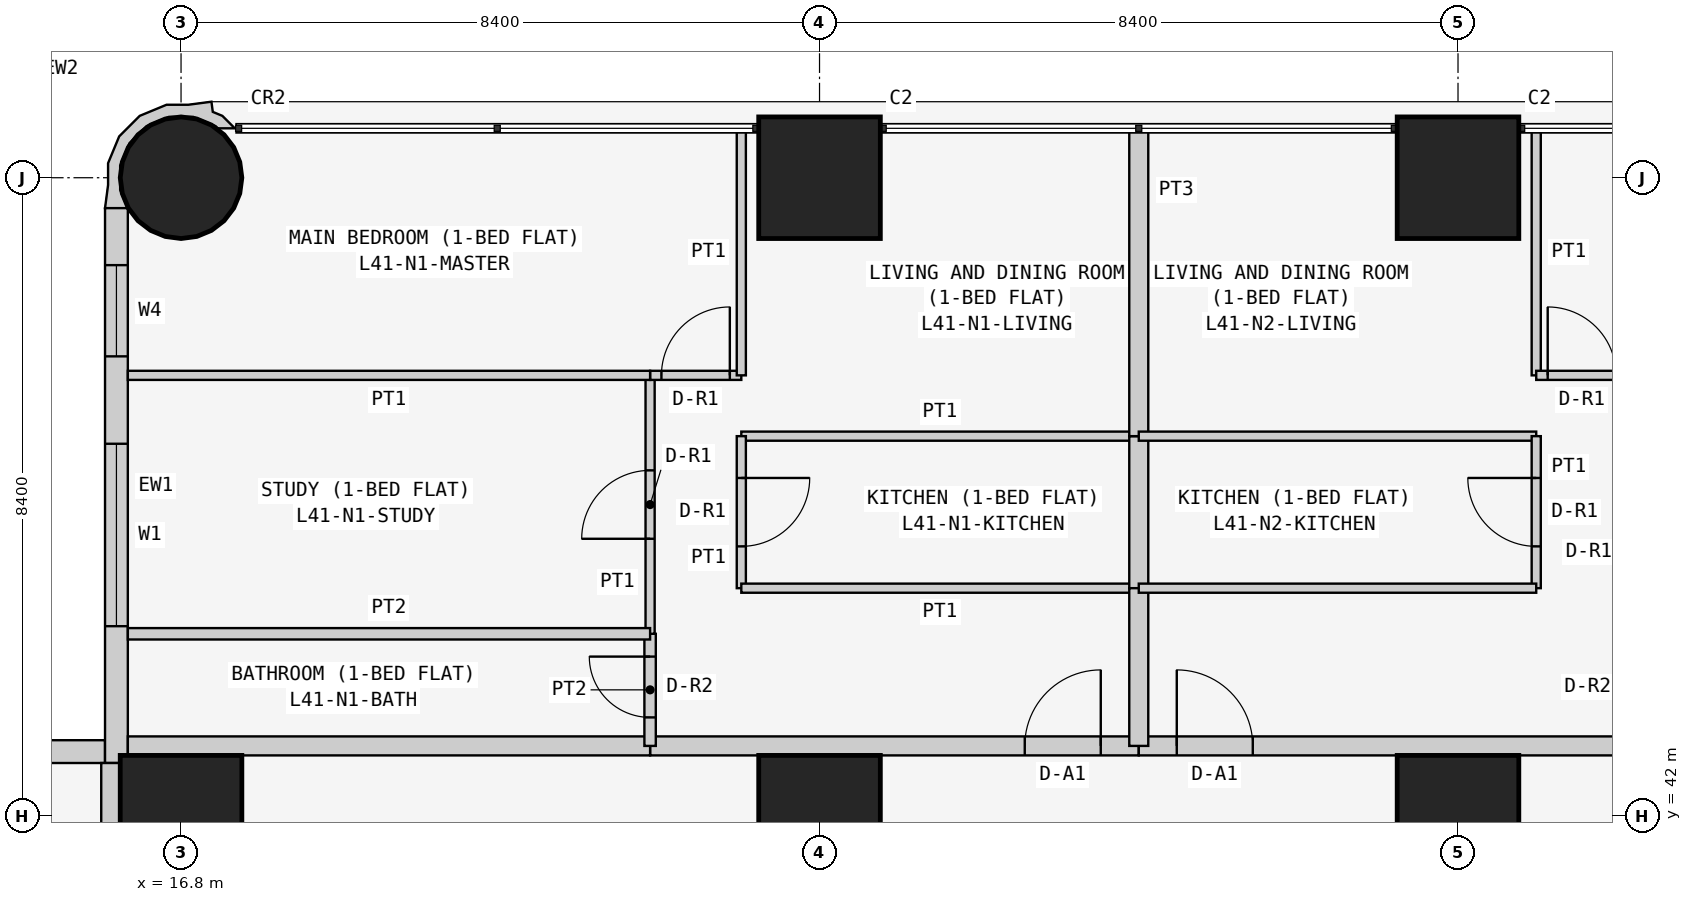
"""IFC4 building model, lengths in metres.
Left out: names, types, materials, properties, quantities, classifications, styles, units other than length and angle.
Written with IfcOpenShell. Run it as: python <this file> out.ifc"""

import sys

from ifc_helpers import new_model, si_unit, direction, frame, frame_2d, origin, origin_2d, place, context, subcontext, project, spatial, polyline, rectangle, circle, outline, extrude, element, fill, save


model = new_model("IFC4")
c1 = context("Model", 3, precision=1e-05, world=origin(), true_north=direction((0.0, 1.0)))
c2 = subcontext(c1, "Body", "Model", "MODEL_VIEW")
j1 = project(units=[si_unit("LENGTHUNIT", "METRE"), si_unit("PLANEANGLEUNIT", "RADIAN")], contexts=[c1])
p1 = place(None, origin())
s1 = spatial("IfcSite", under=j1, at=p1, CompositionType="ELEMENT")
p2 = place(p1, origin())
s2 = spatial("IfcBuilding", under=s1, at=p2, CompositionType="ELEMENT")
p3 = place(p2, frame((0.0, 0.0, 159.3)))
s3 = spatial("IfcBuildingStorey", under=s2, at=p3, CompositionType="ELEMENT", Elevation=159.3)
p4 = place(p3, frame((16.8, 42.0, 0.0), z_axis=(0.0, 0.0, 1.0), x_axis=(1.0, 0.0, 0.0)))
e1 = element("IfcColumn", 1, at=p4, inside=s3, PredefinedType="COLUMN", context=c2, shape_type="SweptSolid", body=[
    extrude(rectangle(XDim=1.6, YDim=1.6, at=origin_2d()), origin(), (0.0, 0.0, 1.0), 3.6),
])
p5 = place(p3, frame((16.8, 50.4, 0.0), z_axis=(0.0, 0.0, 1.0), x_axis=(1.0, 0.0, 0.0)))
e2 = element("IfcColumn", 2, at=p5, inside=s3, PredefinedType="COLUMN", context=c2, shape_type="SweptSolid", body=[
    extrude(circle(Radius=0.8, at=origin_2d()), origin(), (0.0, 0.0, 1.0), 3.6),
])
for number, where, z_axis, x_axis in (
    (3, (25.2, 42.0, 0.0), (0.0, 0.0, 1.0), (1.0, 0.0, 0.0)),
    (4, (25.2, 50.4, 0.0), (0.0, 0.0, 1.0), (1.0, 0.0, 0.0)),
    (5, (33.6, 42.0, 0.0), (0.0, 0.0, 1.0), (1.0, 0.0, 0.0)),
    (6, (33.6, 50.4, 0.0), (0.0, 0.0, 1.0), (1.0, 0.0, 0.0)),
):
    element("IfcColumn", number, at=place(p3, frame(where, z_axis=z_axis, x_axis=x_axis)), inside=s3, PredefinedType="COLUMN", context=c2, shape_type="SweptSolid", body=[
        extrude(rectangle(XDim=1.6, YDim=1.6, at=origin_2d()), origin(), (0.0, 0.0, 1.0), 3.6),
    ])
p6 = place(p3, frame((15.8, 42.85, 0.0), z_axis=(0.0, 0.0, 1.0), x_axis=(-1.0, 0.0, 0.0)))
e7 = element("IfcWall", 7, at=p6, inside=s3, PredefinedType="SOLIDWALL", context=c2, shape_type="SweptSolid", body=[
    extrude(rectangle(XDim=15.4, YDim=0.3, at=frame_2d((7.7, 0.0))), origin(), (0.0, 0.0, 1.0), 3.45),
])
p7 = place(p6, frame((1.2, 0.0, 0.9)))
e8 = element("IfcOpeningElement", 8, at=p7, cuts=e7, PredefinedType="OPENING", context=c2, shape_type="SweptSolid", body=[
    extrude(rectangle(XDim=1.8, YDim=1.5, at=frame_2d((0.9, 0.75))), frame((0.0, 0.16, 0.0), z_axis=(0.0, -1.0, 0.0), x_axis=(1.0, 0.0, 0.0)), (0.0, 0.0, 1.0), 0.32),
])
p8 = place(p6, frame((4.95, 0.0, 1.5)))
e9 = element("IfcOpeningElement", 9, at=p8, cuts=e7, PredefinedType="OPENING", context=c2, shape_type="SweptSolid", body=[
    extrude(rectangle(XDim=0.9, YDim=0.7, at=frame_2d((0.45, 0.35))), frame((0.0, 0.16, 0.0), z_axis=(0.0, -1.0, 0.0), x_axis=(1.0, 0.0, 0.0)), (0.0, 0.0, 1.0), 0.32),
])
p9 = place(p6, frame((8.5, 0.0, 0.9)))
e10 = element("IfcOpeningElement", 10, at=p9, cuts=e7, PredefinedType="OPENING", context=c2, shape_type="SweptSolid", body=[
    extrude(rectangle(XDim=1.8, YDim=1.5, at=frame_2d((0.9, 0.75))), frame((0.0, 0.16, 0.0), z_axis=(0.0, -1.0, 0.0), x_axis=(1.0, 0.0, 0.0)), (0.0, 0.0, 1.0), 0.32),
])
p10 = place(p6, frame((12.5, 0.0, 0.0)))
e11 = element("IfcOpeningElement", 11, at=p10, cuts=e7, PredefinedType="OPENING", context=c2, shape_type="SweptSolid", body=[
    extrude(rectangle(XDim=0.9, YDim=2.4, at=frame_2d((0.45, 1.2))), frame((0.0, 0.16, 0.0), z_axis=(0.0, -1.0, 0.0), x_axis=(1.0, 0.0, 0.0)), (0.0, 0.0, 1.0), 0.32),
])
p11 = place(p6, frame((13.5, 0.0, 0.9)))
e12 = element("IfcOpeningElement", 12, at=p11, cuts=e7, PredefinedType="OPENING", context=c2, shape_type="SweptSolid", body=[
    extrude(rectangle(XDim=1.2, YDim=1.5, at=frame_2d((0.6, 0.75))), frame((0.0, 0.16, 0.0), z_axis=(0.0, -1.0, 0.0), x_axis=(1.0, 0.0, 0.0)), (0.0, 0.0, 1.0), 0.32),
])
p12 = place(p3, frame((15.95, 50.0, 0.0), z_axis=(0.0, 0.0, 1.0), x_axis=(0.0, -1.0, 0.0)))
e13 = element("IfcWall", 13, at=p12, inside=s3, PredefinedType="SOLIDWALL", context=c2, shape_type="SweptSolid", body=[
    extrude(rectangle(XDim=7.3, YDim=0.3, at=frame_2d((3.65, 0.0))), origin(), (0.0, 0.0, 1.0), 3.45),
])
p13 = place(p12, frame((3.1, 0.0, 0.9)))
e14 = element("IfcOpeningElement", 14, at=p13, cuts=e13, PredefinedType="OPENING", context=c2, shape_type="SweptSolid", body=[
    extrude(rectangle(XDim=2.4, YDim=1.5, at=frame_2d((1.2, 0.75))), frame((0.0, 0.16, 0.0), z_axis=(0.0, -1.0, 0.0), x_axis=(1.0, 0.0, 0.0)), (0.0, 0.0, 1.0), 0.32),
])
p14 = place(p12, frame((0.75, 0.0, 0.9)))
e15 = element("IfcOpeningElement", 15, at=p14, cuts=e13, PredefinedType="OPENING", context=c2, shape_type="SweptSolid", body=[
    extrude(rectangle(XDim=1.2, YDim=1.5, at=frame_2d((0.6, 0.75))), frame((0.0, 0.16, 0.0), z_axis=(0.0, -1.0, 0.0), x_axis=(1.0, 0.0, 0.0)), (0.0, 0.0, 1.0), 0.32),
])
p15 = place(p3, frame((17.448, 50.995, 0.0), z_axis=(0.0, 0.0, 1.0), x_axis=(-0.343276641956, 0.93923434088, 0.0)))
e16 = element("IfcWall", 16, at=p15, inside=s3, PredefinedType="SOLIDWALL", context=c2, shape_type="SweptSolid", body=[
    extrude(outline(polyline([(0.241, 0.023), (0.333, 0.124), (0.465, 0.094), (0.532, 0.393), (0.631, 0.663), (0.614, 1.045), (0.454, 1.391), (0.172, 1.649), (-0.098, 1.748), (-0.369, 1.89), (-0.509, 1.621), (-0.491, 1.615), (-0.479, 1.609), (-0.211, 1.62), (0.088, 1.511), (0.323, 1.295), (0.457, 1.006), (0.47, 0.688), (0.361, 0.389), (0.145, 0.154), (0.108, 0.137), (0.031, -0.075), (0.241, 0.023)])), origin(), (0.0, 0.0, 1.0), 3.45),
])
p16 = place(p3, frame((22.971, 42.925, 0.0), z_axis=(0.0, 0.0, 1.0), x_axis=(1.0, 0.0, 0.0)))
e17 = element("IfcWall", 17, at=p16, inside=s3, PredefinedType="PARTITIONING", context=c2, shape_type="SweptSolid", body=[
    extrude(rectangle(XDim=6.429, YDim=0.25, at=frame_2d((3.214, 0.0))), origin(), (0.0, 0.0, 1.0), 3.45),
])
p17 = place(p16, frame((4.929, 0.0, 0.0)))
e18 = element("IfcOpeningElement", 18, at=p17, cuts=e17, PredefinedType="OPENING", context=c2, shape_type="SweptSolid", body=[
    extrude(rectangle(XDim=1.0, YDim=2.1, at=frame_2d((0.5, 1.05))), frame((0.0, 0.135, 0.0), z_axis=(0.0, -1.0, 0.0), x_axis=(1.0, 0.0, 0.0)), (0.0, 0.0, 1.0), 0.27),
])
p18 = place(p3, frame((16.1, 42.925, 0.0), z_axis=(0.0, 0.0, 1.0), x_axis=(1.0, 0.0, 0.0)))
e19 = element("IfcWall", 19, at=p18, inside=s3, PredefinedType="PARTITIONING", context=c2, shape_type="SweptSolid", body=[
    extrude(rectangle(XDim=6.871, YDim=0.25, at=frame_2d((3.436, 0.0))), origin(), (0.0, 0.0, 1.0), 3.45),
])
p19 = place(p3, frame((29.4, 42.925, 0.0), z_axis=(0.0, 0.0, 1.0), x_axis=(1.0, 0.0, 0.0)))
e20 = element("IfcWall", 20, at=p19, inside=s3, PredefinedType="PARTITIONING", context=c2, shape_type="SweptSolid", body=[
    extrude(rectangle(XDim=6.429, YDim=0.25, at=frame_2d((3.215, 0.0))), origin(), (0.0, 0.0, 1.0), 3.45),
])
p20 = place(p19, frame((0.5, 0.0, 0.0)))
e21 = element("IfcOpeningElement", 21, at=p20, cuts=e20, PredefinedType="OPENING", context=c2, shape_type="SweptSolid", body=[
    extrude(rectangle(XDim=1.0, YDim=2.1, at=frame_2d((0.5, 1.05))), frame((0.0, 0.135, 0.0), z_axis=(0.0, -1.0, 0.0), x_axis=(1.0, 0.0, 0.0)), (0.0, 0.0, 1.0), 0.27),
])
p21 = place(p3, frame((15.875, 35.829, 0.0), z_axis=(0.0, 0.0, 1.0), x_axis=(0.0, 1.0, 0.0)))
e22 = element("IfcWall", 22, at=p21, inside=s3, PredefinedType="PARTITIONING", context=c2, shape_type="SweptSolid", body=[
    extrude(rectangle(XDim=6.871, YDim=0.25, at=frame_2d((3.436, 0.0))), origin(), (0.0, 0.0, 1.0), 3.45),
])
p22 = place(p3, frame((29.4, 47.0, 0.0), z_axis=(0.0, 0.0, 1.0), x_axis=(-1.0, 0.0, 0.0)))
e23 = element("IfcWall", 23, at=p22, inside=s3, PredefinedType="PARTITIONING", context=c2, shape_type="SweptSolid", body=[
    extrude(rectangle(XDim=5.229, YDim=0.12, at=frame_2d((2.615, 0.0))), origin(), (0.0, 0.0, 1.0), 3.45),
])
p23 = place(p3, frame((24.171, 47.0, 0.0), z_axis=(0.0, 0.0, 1.0), x_axis=(0.0, -1.0, 0.0)))
e24 = element("IfcWall", 24, at=p23, inside=s3, PredefinedType="PARTITIONING", context=c2, shape_type="SweptSolid", body=[
    extrude(rectangle(XDim=2.0, YDim=0.12, at=frame_2d((1.0, 0.0))), origin(), (0.0, 0.0, 1.0), 3.45),
])
p24 = place(p23, frame((0.55, 0.0, 0.0)))
e25 = element("IfcOpeningElement", 25, at=p24, cuts=e24, PredefinedType="OPENING", context=c2, shape_type="SweptSolid", body=[
    extrude(rectangle(XDim=0.9, YDim=2.1, at=frame_2d((0.45, 1.05))), frame((0.0, 0.07, 0.0), z_axis=(0.0, -1.0, 0.0), x_axis=(1.0, 0.0, 0.0)), (0.0, 0.0, 1.0), 0.14),
])
p25 = place(p3, frame((24.171, 45.0, 0.0), z_axis=(0.0, 0.0, 1.0), x_axis=(1.0, 0.0, 0.0)))
e26 = element("IfcWall", 26, at=p25, inside=s3, PredefinedType="PARTITIONING", context=c2, shape_type="SweptSolid", body=[
    extrude(rectangle(XDim=5.229, YDim=0.12, at=frame_2d((2.615, 0.0))), origin(), (0.0, 0.0, 1.0), 3.45),
])
p26 = place(p3, frame((29.4, 45.0, 0.0), z_axis=(0.0, 0.0, 1.0), x_axis=(0.0, 1.0, 0.0)))
e27 = element("IfcWall", 27, at=p26, inside=s3, PredefinedType="PARTITIONING", context=c2, shape_type="SweptSolid", body=[
    extrude(rectangle(XDim=2.0, YDim=0.25, at=frame_2d((1.0, 0.0))), origin(), (0.0, 0.0, 1.0), 2.848),
])
p27 = place(p3, frame((22.971, 42.925, 0.0), z_axis=(0.0, 0.0, 1.0), x_axis=(0.0, 1.0, 0.0)))
e28 = element("IfcWall", 28, at=p27, inside=s3, PredefinedType="PARTITIONING", context=c2, shape_type="SweptSolid", body=[
    extrude(rectangle(XDim=1.475, YDim=0.15, at=frame_2d((0.737, 0.0))), origin(), (0.0, 0.0, 1.0), 3.45),
])
p28 = place(p27, frame((0.375, 0.0, 0.0)))
e29 = element("IfcOpeningElement", 29, at=p28, cuts=e28, PredefinedType="OPENING", context=c2, shape_type="SweptSolid", body=[
    extrude(rectangle(XDim=0.8, YDim=2.1, at=frame_2d((0.4, 1.05))), frame((0.0, 0.085, 0.0), z_axis=(0.0, -1.0, 0.0), x_axis=(1.0, 0.0, 0.0)), (0.0, 0.0, 1.0), 0.17),
])
p29 = place(p3, frame((22.971, 44.4, 0.0), z_axis=(0.0, 0.0, 1.0), x_axis=(0.0, 1.0, 0.0)))
e30 = element("IfcWall", 30, at=p29, inside=s3, PredefinedType="PARTITIONING", context=c2, shape_type="SweptSolid", body=[
    extrude(rectangle(XDim=3.4, YDim=0.12, at=frame_2d((1.7, 0.0))), origin(), (0.0, 0.0, 1.0), 3.45),
])
p30 = place(p29, frame((1.25, 0.0, 0.0)))
e31 = element("IfcOpeningElement", 31, at=p30, cuts=e30, PredefinedType="OPENING", context=c2, shape_type="SweptSolid", body=[
    extrude(rectangle(XDim=0.9, YDim=2.1, at=frame_2d((0.45, 1.05))), frame((0.0, 0.07, 0.0), z_axis=(0.0, -1.0, 0.0), x_axis=(1.0, 0.0, 0.0)), (0.0, 0.0, 1.0), 0.14),
])
p31 = place(p3, frame((22.971, 47.8, 0.0), z_axis=(0.0, 0.0, 1.0), x_axis=(1.0, 0.0, 0.0)))
e32 = element("IfcWall", 32, at=p31, inside=s3, PredefinedType="PARTITIONING", context=c2, shape_type="SweptSolid", body=[
    extrude(rectangle(XDim=1.2, YDim=0.12, at=frame_2d((0.6, 0.0))), origin(), (0.0, 0.0, 1.0), 3.45),
])
p32 = place(p31, frame((0.149, 0.0, 0.0)))
e33 = element("IfcOpeningElement", 33, at=p32, cuts=e32, PredefinedType="OPENING", context=c2, shape_type="SweptSolid", body=[
    extrude(rectangle(XDim=0.9, YDim=2.1, at=frame_2d((0.45, 1.05))), frame((0.0, 0.07, 0.0), z_axis=(0.0, -1.0, 0.0), x_axis=(1.0, 0.0, 0.0)), (0.0, 0.0, 1.0), 0.14),
])
p33 = place(p3, frame((24.171, 47.8, 0.0), z_axis=(0.0, 0.0, 1.0), x_axis=(0.0, 1.0, 0.0)))
e34 = element("IfcWall", 34, at=p33, inside=s3, PredefinedType="PARTITIONING", context=c2, shape_type="SweptSolid", body=[
    extrude(rectangle(XDim=3.25, YDim=0.12, at=frame_2d((1.625, 0.0))), origin(), (0.0, 0.0, 1.0), 3.45),
])
p34 = place(p3, frame((29.4, 45.0, 0.0), z_axis=(0.0, 0.0, 1.0), x_axis=(0.0, -1.0, 0.0)))
e35 = element("IfcWall", 35, at=p34, inside=s3, PredefinedType="PARTITIONING", context=c2, shape_type="SweptSolid", body=[
    extrude(rectangle(XDim=2.075, YDim=0.25, at=frame_2d((1.038, 0.0))), origin(), (0.0, 0.0, 1.0), 2.848),
])
p35 = place(p3, frame((29.4, 51.05, 0.0), z_axis=(0.0, 0.0, 1.0), x_axis=(0.0, -1.0, 0.0)))
e36 = element("IfcWall", 36, at=p35, inside=s3, PredefinedType="PARTITIONING", context=c2, shape_type="SweptSolid", body=[
    extrude(rectangle(XDim=4.05, YDim=0.25, at=frame_2d((2.025, 0.0))), origin(), (0.0, 0.0, 1.0), 2.848),
])
p36 = place(p3, frame((22.971, 44.4, 0.0), z_axis=(0.0, 0.0, 1.0), x_axis=(-1.0, 0.0, 0.0)))
e37 = element("IfcWall", 37, at=p36, inside=s3, PredefinedType="PARTITIONING", context=c2, shape_type="SweptSolid", body=[
    extrude(rectangle(XDim=6.871, YDim=0.15, at=frame_2d((3.436, 0.0))), origin(), (0.0, 0.0, 1.0), 3.45),
])
p37 = place(p3, frame((22.971, 47.8, 0.0), z_axis=(0.0, 0.0, 1.0), x_axis=(-1.0, 0.0, 0.0)))
e38 = element("IfcWall", 38, at=p37, inside=s3, PredefinedType="PARTITIONING", context=c2, shape_type="SweptSolid", body=[
    extrude(rectangle(XDim=6.871, YDim=0.12, at=frame_2d((3.436, 0.0))), origin(), (0.0, 0.0, 1.0), 3.45),
])
p38 = place(p3, frame((29.4, 47.0, 0.0), z_axis=(0.0, 0.0, 1.0), x_axis=(1.0, 0.0, 0.0)))
e39 = element("IfcWall", 39, at=p38, inside=s3, PredefinedType="PARTITIONING", context=c2, shape_type="SweptSolid", body=[
    extrude(rectangle(XDim=5.229, YDim=0.12, at=frame_2d((2.615, 0.0))), origin(), (0.0, 0.0, 1.0), 3.45),
])
p39 = place(p3, frame((34.629, 47.0, 0.0), z_axis=(0.0, 0.0, 1.0), x_axis=(0.0, -1.0, 0.0)))
e40 = element("IfcWall", 40, at=p39, inside=s3, PredefinedType="PARTITIONING", context=c2, shape_type="SweptSolid", body=[
    extrude(rectangle(XDim=2.0, YDim=0.12, at=frame_2d((1.0, 0.0))), origin(), (0.0, 0.0, 1.0), 3.45),
])
p40 = place(p39, frame((0.55, 0.0, 0.0)))
e41 = element("IfcOpeningElement", 41, at=p40, cuts=e40, PredefinedType="OPENING", context=c2, shape_type="SweptSolid", body=[
    extrude(rectangle(XDim=0.9, YDim=2.1, at=frame_2d((0.45, 1.05))), frame((0.0, 0.07, 0.0), z_axis=(0.0, -1.0, 0.0), x_axis=(1.0, 0.0, 0.0)), (0.0, 0.0, 1.0), 0.14),
])
p41 = place(p3, frame((34.629, 45.0, 0.0), z_axis=(0.0, 0.0, 1.0), x_axis=(-1.0, 0.0, 0.0)))
e42 = element("IfcWall", 42, at=p41, inside=s3, PredefinedType="PARTITIONING", context=c2, shape_type="SweptSolid", body=[
    extrude(rectangle(XDim=5.229, YDim=0.12, at=frame_2d((2.615, 0.0))), origin(), (0.0, 0.0, 1.0), 3.45),
])
p42 = place(p3, frame((34.629, 51.05, 0.0), z_axis=(0.0, 0.0, 1.0), x_axis=(0.0, -1.0, 0.0)))
e43 = element("IfcWall", 43, at=p42, inside=s3, PredefinedType="PARTITIONING", context=c2, shape_type="SweptSolid", body=[
    extrude(rectangle(XDim=3.25, YDim=0.12, at=frame_2d((1.625, 0.0))), origin(), (0.0, 0.0, 1.0), 3.45),
])
p43 = place(p3, frame((34.629, 47.8, 0.0), z_axis=(0.0, 0.0, 1.0), x_axis=(1.0, 0.0, 0.0)))
e44 = element("IfcWall", 44, at=p43, inside=s3, PredefinedType="PARTITIONING", context=c2, shape_type="SweptSolid", body=[
    extrude(rectangle(XDim=1.2, YDim=0.12, at=frame_2d((0.6, 0.0))), origin(), (0.0, 0.0, 1.0), 3.45),
])
p44 = place(p43, frame((0.151, 0.0, 0.0)))
e45 = element("IfcOpeningElement", 45, at=p44, cuts=e44, PredefinedType="OPENING", context=c2, shape_type="SweptSolid", body=[
    extrude(rectangle(XDim=0.9, YDim=2.1, at=frame_2d((0.45, 1.05))), frame((0.0, 0.07, 0.0), z_axis=(0.0, -1.0, 0.0), x_axis=(1.0, 0.0, 0.0)), (0.0, 0.0, 1.0), 0.14),
])
p45 = place(p13, origin())
e46 = element("IfcWindow", 46, at=p45, inside=s3, PartitioningType="SINGLE_PANEL", PredefinedType="WINDOW", context=c2, shape_type="SweptSolid", body=[
    extrude(rectangle(XDim=2.4, YDim=1.5, at=frame_2d((1.2, 0.75))), frame((0.0, 0.03, 0.0), z_axis=(0.0, -1.0, 0.0), x_axis=(1.0, 0.0, 0.0)), (0.0, 0.0, 1.0), 0.06),
])
fill(e14, e46)
p46 = place(p14, origin())
e47 = element("IfcWindow", 47, at=p46, inside=s3, PartitioningType="SINGLE_PANEL", PredefinedType="WINDOW", context=c2, shape_type="SweptSolid", body=[
    extrude(rectangle(XDim=1.2, YDim=1.5, at=frame_2d((0.6, 0.75))), frame((0.0, 0.03, 0.0), z_axis=(0.0, -1.0, 0.0), x_axis=(1.0, 0.0, 0.0)), (0.0, 0.0, 1.0), 0.06),
])
fill(e15, e47)
p47 = place(p17, origin())
e48 = element("IfcDoor", 48, at=p47, inside=s3, OperationType="SINGLE_SWING_RIGHT", PredefinedType="DOOR", context=c2, shape_type="SweptSolid", body=[
    extrude(rectangle(XDim=1.0, YDim=2.1, at=frame_2d((0.5, 1.05))), frame((0.0, 0.025, 0.0), z_axis=(0.0, -1.0, 0.0), x_axis=(1.0, 0.0, 0.0)), (0.0, 0.0, 1.0), 0.05),
])
fill(e18, e48)
p48 = place(p24, origin())
e49 = element("IfcDoor", 49, at=p48, inside=s3, OperationType="SINGLE_SWING_LEFT", PredefinedType="DOOR", context=c2, shape_type="SweptSolid", body=[
    extrude(rectangle(XDim=0.9, YDim=2.1, at=frame_2d((0.45, 1.05))), frame((0.0, 0.025, 0.0), z_axis=(0.0, -1.0, 0.0), x_axis=(1.0, 0.0, 0.0)), (0.0, 0.0, 1.0), 0.05),
])
fill(e25, e49)
p49 = place(p28, origin())
e50 = element("IfcDoor", 50, at=p49, inside=s3, OperationType="SINGLE_SWING_RIGHT", PredefinedType="DOOR", context=c2, shape_type="SweptSolid", body=[
    extrude(rectangle(XDim=0.8, YDim=2.1, at=frame_2d((0.4, 1.05))), frame((0.0, 0.025, 0.0), z_axis=(0.0, -1.0, 0.0), x_axis=(1.0, 0.0, 0.0)), (0.0, 0.0, 1.0), 0.05),
])
fill(e29, e50)
p50 = place(p30, origin())
e51 = element("IfcDoor", 51, at=p50, inside=s3, OperationType="SINGLE_SWING_LEFT", PredefinedType="DOOR", context=c2, shape_type="SweptSolid", body=[
    extrude(rectangle(XDim=0.9, YDim=2.1, at=frame_2d((0.45, 1.05))), frame((0.0, 0.025, 0.0), z_axis=(0.0, -1.0, 0.0), x_axis=(1.0, 0.0, 0.0)), (0.0, 0.0, 1.0), 0.05),
])
fill(e31, e51)
p51 = place(p32, origin())
e52 = element("IfcDoor", 52, at=p51, inside=s3, OperationType="SINGLE_SWING_RIGHT", PredefinedType="DOOR", context=c2, shape_type="SweptSolid", body=[
    extrude(rectangle(XDim=0.9, YDim=2.1, at=frame_2d((0.45, 1.05))), frame((0.0, 0.025, 0.0), z_axis=(0.0, -1.0, 0.0), x_axis=(1.0, 0.0, 0.0)), (0.0, 0.0, 1.0), 0.05),
])
fill(e33, e52)
p52 = place(p20, origin())
e53 = element("IfcDoor", 53, at=p52, inside=s3, OperationType="SINGLE_SWING_LEFT", PredefinedType="DOOR", context=c2, shape_type="SweptSolid", body=[
    extrude(rectangle(XDim=1.0, YDim=2.1, at=frame_2d((0.5, 1.05))), frame((0.0, 0.025, 0.0), z_axis=(0.0, -1.0, 0.0), x_axis=(1.0, 0.0, 0.0)), (0.0, 0.0, 1.0), 0.05),
])
fill(e21, e53)
p53 = place(p40, frame((0.9, 0.0, 0.0), z_axis=(0.0, 0.0, 1.0), x_axis=(-1.0, 0.0, 0.0)))
e54 = element("IfcDoor", 54, at=p53, inside=s3, OperationType="SINGLE_SWING_RIGHT", PredefinedType="DOOR", context=c2, shape_type="SweptSolid", body=[
    extrude(rectangle(XDim=0.9, YDim=2.1, at=frame_2d((0.45, 1.05))), frame((0.0, 0.025, 0.0), z_axis=(0.0, -1.0, 0.0), x_axis=(1.0, 0.0, 0.0)), (0.0, 0.0, 1.0), 0.05),
])
fill(e41, e54)
p54 = place(p44, origin())
e55 = element("IfcDoor", 55, at=p54, inside=s3, OperationType="SINGLE_SWING_LEFT", PredefinedType="DOOR", context=c2, shape_type="SweptSolid", body=[
    extrude(rectangle(XDim=0.9, YDim=2.1, at=frame_2d((0.45, 1.05))), frame((0.0, 0.025, 0.0), z_axis=(0.0, -1.0, 0.0), x_axis=(1.0, 0.0, 0.0)), (0.0, 0.0, 1.0), 0.05),
])
fill(e45, e55)
save(model, sys.argv[1])
